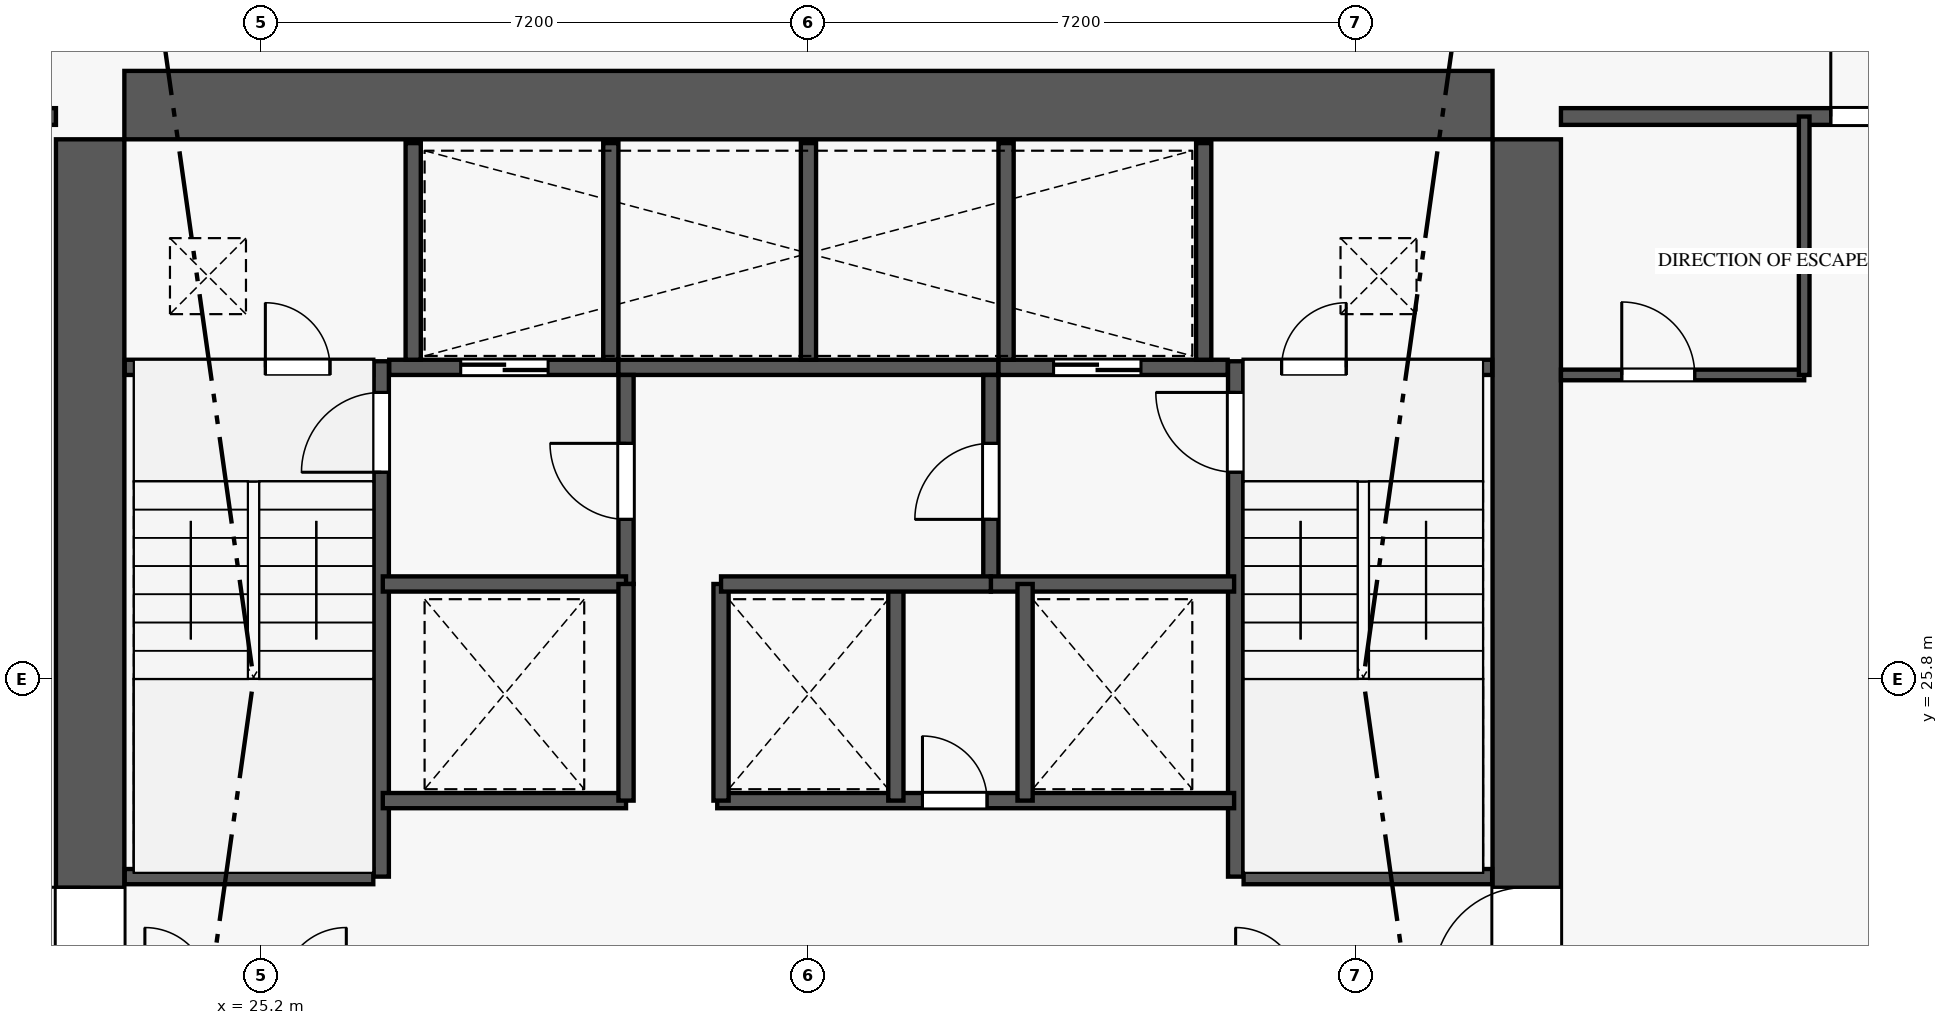
"""IFC4 building model, lengths in metres.
Left out: names, types, materials, properties, quantities, classifications, styles, units other than length and angle.
Written with IfcOpenShell. Run it as: python <this file> out.ifc"""

import sys

from ifc_helpers import new_model, si_unit, direction, frame, frame_2d, origin, origin_2d, place, context, subcontext, project, spatial, rectangle, extrude, element, fill, save


model = new_model("IFC4")
c1 = context("Model", 3, precision=1e-05, world=origin(), true_north=direction((0.0, 1.0)))
c2 = subcontext(c1, "Body", "Model", "MODEL_VIEW")
j1 = project(units=[si_unit("LENGTHUNIT", "METRE"), si_unit("PLANEANGLEUNIT", "RADIAN")], contexts=[c1])
p1 = place(None, origin())
s1 = spatial("IfcSite", under=j1, at=p1, CompositionType="ELEMENT")
p2 = place(p1, origin())
s2 = spatial("IfcBuilding", under=s1, at=p2, CompositionType="ELEMENT")
p3 = place(p2, frame((0.0, 0.0, 74.6)))
s3 = spatial("IfcBuildingStorey", under=s2, at=p3, CompositionType="ELEMENT", Elevation=74.6)
for number, where, z_axis, x_axis in (
    (1, (41.85, 33.35, 0.0), (0.0, 0.0, 1.0), (1.0, 0.0, 0.0)),
    (2, (22.95, 33.35, 0.0), (0.0, 0.0, 1.0), (1.0, 0.0, 0.0)),
):
    element("IfcColumn", number, at=place(p3, frame(where, z_axis=z_axis, x_axis=x_axis)), inside=s3, PredefinedType="COLUMN", context=c2, shape_type="SweptSolid", body=[
        extrude(rectangle(XDim=0.9, YDim=0.9, at=origin_2d()), origin(), (0.0, 0.0, 1.0), 5.4),
    ])
p4 = place(p3, frame((23.4, 33.35, 0.0), z_axis=(0.0, 0.0, 1.0), x_axis=(1.0, 0.0, 0.0)))
e3 = element("IfcWall", 3, at=p4, inside=s3, PredefinedType="SHEAR", context=c2, shape_type="SweptSolid", body=[
    extrude(rectangle(XDim=18.0, YDim=0.9, at=frame_2d((9.0, 0.0))), origin(), (0.0, 0.0, 1.0), 5.18),
])
p5 = place(p3, frame((22.95, 18.9, 0.0), z_axis=(0.0, 0.0, 1.0), x_axis=(0.0, 1.0, 0.0)))
e4 = element("IfcWall", 4, at=p5, inside=s3, PredefinedType="SHEAR", context=c2, shape_type="SweptSolid", body=[
    extrude(rectangle(XDim=14.0, YDim=0.9, at=frame_2d((7.0, 0.0))), origin(), (0.0, 0.0, 1.0), 5.18),
])
p6 = place(p5, frame((2.94, 0.0, 0.0)))
e5 = element("IfcOpeningElement", 5, at=p6, cuts=e4, PredefinedType="OPENING", context=c2, shape_type="SweptSolid", body=[
    extrude(rectangle(XDim=1.22, YDim=2.25, at=frame_2d((0.61, 1.125))), frame((0.0, 0.46, 0.0), z_axis=(0.0, -1.0, 0.0), x_axis=(1.0, 0.0, 0.0)), (0.0, 0.0, 1.0), 0.92),
])
p7 = place(p3, frame((41.85, 18.9, 0.0), z_axis=(0.0, 0.0, 1.0), x_axis=(0.0, 1.0, 0.0)))
e6 = element("IfcWall", 6, at=p7, inside=s3, PredefinedType="SHEAR", context=c2, shape_type="SweptSolid", body=[
    extrude(rectangle(XDim=14.0, YDim=0.9, at=frame_2d((7.0, 0.0))), origin(), (0.0, 0.0, 1.0), 5.18),
])
p8 = place(p7, frame((2.94, 0.0, 0.0)))
e7 = element("IfcOpeningElement", 7, at=p8, cuts=e6, PredefinedType="OPENING", context=c2, shape_type="SweptSolid", body=[
    extrude(rectangle(XDim=1.22, YDim=2.25, at=frame_2d((0.61, 1.125))), frame((0.0, 0.46, 0.0), z_axis=(0.0, -1.0, 0.0), x_axis=(1.0, 0.0, 0.0)), (0.0, 0.0, 1.0), 0.92),
])
p9 = place(p3, frame((26.78, 23.2, 0.0), z_axis=(0.0, 0.0, 1.0), x_axis=(0.0, 1.0, 0.0)))
e8 = element("IfcWall", 8, at=p9, inside=s3, PredefinedType="SHEAR", context=c2, shape_type="SweptSolid", body=[
    extrude(rectangle(XDim=6.78, YDim=0.2, at=frame_2d((3.39, 0.0))), origin(), (0.0, 0.0, 1.0), 5.4),
])
p10 = place(p9, frame((5.32, 0.0, 0.0)))
e9 = element("IfcOpeningElement", 9, at=p10, cuts=e8, PredefinedType="OPENING", context=c2, shape_type="SweptSolid", body=[
    extrude(rectangle(XDim=1.05, YDim=2.15, at=frame_2d((0.525, 1.075))), frame((0.0, 0.11, 0.0), z_axis=(0.0, -1.0, 0.0), x_axis=(1.0, 0.0, 0.0)), (0.0, 0.0, 1.0), 0.22),
])
p11 = place(p3, frame((23.405, 23.2, 0.0), z_axis=(0.0, 0.0, 1.0), x_axis=(1.0, 0.0, 0.0)))
e10 = element("IfcWall", 10, at=p11, inside=s3, PredefinedType="PLUMBINGWALL", context=c2, shape_type="SweptSolid", body=[
    extrude(rectangle(XDim=3.27, YDim=0.2, at=frame_2d((1.635, 0.0))), origin(), (0.0, 0.0, 1.0), 5.18),
])
p12 = place(p3, frame((38.02, 23.2, 0.0), z_axis=(0.0, 0.0, 1.0), x_axis=(0.0, 1.0, 0.0)))
e11 = element("IfcWall", 11, at=p12, inside=s3, PredefinedType="SHEAR", context=c2, shape_type="SweptSolid", body=[
    extrude(rectangle(XDim=6.78, YDim=0.2, at=frame_2d((3.39, 0.0))), origin(), (0.0, 0.0, 1.0), 5.4),
])
p13 = place(p12, frame((5.32, 0.0, 0.0)))
e12 = element("IfcOpeningElement", 12, at=p13, cuts=e11, PredefinedType="OPENING", context=c2, shape_type="SweptSolid", body=[
    extrude(rectangle(XDim=1.05, YDim=2.15, at=frame_2d((0.525, 1.075))), frame((0.0, 0.11, 0.0), z_axis=(0.0, -1.0, 0.0), x_axis=(1.0, 0.0, 0.0)), (0.0, 0.0, 1.0), 0.22),
])
p14 = place(p3, frame((38.125, 23.2, 0.0), z_axis=(0.0, 0.0, 1.0), x_axis=(1.0, 0.0, 0.0)))
e13 = element("IfcWall", 13, at=p14, inside=s3, PredefinedType="PLUMBINGWALL", context=c2, shape_type="SweptSolid", body=[
    extrude(rectangle(XDim=3.27, YDim=0.2, at=frame_2d((1.635, 0.0))), origin(), (0.0, 0.0, 1.0), 5.18),
])
p15 = place(p3, frame((23.405, 29.9, 0.0), z_axis=(0.0, 0.0, 1.0), x_axis=(1.0, 0.0, 0.0)))
e14 = element("IfcWall", 14, at=p15, inside=s3, PredefinedType="PLUMBINGWALL", context=c2, shape_type="SweptSolid", body=[
    extrude(rectangle(XDim=3.27, YDim=0.2, at=frame_2d((1.635, 0.0))), origin(), (0.0, 0.0, 1.0), 5.18),
])
p16 = place(p15, frame((1.85, 0.0, 0.0)))
e15 = element("IfcOpeningElement", 15, at=p16, cuts=e14, PredefinedType="OPENING", context=c2, shape_type="SweptSolid", body=[
    extrude(rectangle(XDim=0.85, YDim=2.05, at=frame_2d((0.425, 1.025))), frame((0.0, 0.11, 0.0), z_axis=(0.0, -1.0, 0.0), x_axis=(1.0, 0.0, 0.0)), (0.0, 0.0, 1.0), 0.22),
])
p17 = place(p3, frame((26.885, 29.9, 0.0), z_axis=(0.0, 0.0, 1.0), x_axis=(1.0, 0.0, 0.0)))
e16 = element("IfcWall", 16, at=p17, inside=s3, PredefinedType="PLUMBINGWALL", context=c2, shape_type="SweptSolid", body=[
    extrude(rectangle(XDim=3.015, YDim=0.2, at=frame_2d((1.507, 0.0))), origin(), (0.0, 0.0, 1.0), 5.18),
])
p18 = place(p17, frame((0.94, 0.0, 0.0)))
e17 = element("IfcOpeningElement", 17, at=p18, cuts=e16, PredefinedType="OPENING", context=c2, shape_type="SweptSolid", body=[
    extrude(rectangle(XDim=1.15, YDim=2.2, at=frame_2d((0.575, 1.1))), frame((0.0, 0.11, 0.0), z_axis=(0.0, -1.0, 0.0), x_axis=(1.0, 0.0, 0.0)), (0.0, 0.0, 1.0), 0.22),
])
p19 = place(p3, frame((29.9, 29.9, 0.0), z_axis=(0.0, 0.0, 1.0), x_axis=(1.0, 0.0, 0.0)))
e18 = element("IfcWall", 18, at=p19, inside=s3, PredefinedType="PLUMBINGWALL", context=c2, shape_type="SweptSolid", body=[
    extrude(rectangle(XDim=5.0, YDim=0.2, at=frame_2d((2.5, 0.0))), origin(), (0.0, 0.0, 1.0), 5.18),
])
p20 = place(p3, frame((34.9, 29.9, 0.0), z_axis=(0.0, 0.0, 1.0), x_axis=(1.0, 0.0, 0.0)))
e19 = element("IfcWall", 19, at=p20, inside=s3, PredefinedType="PLUMBINGWALL", context=c2, shape_type="SweptSolid", body=[
    extrude(rectangle(XDim=3.015, YDim=0.2, at=frame_2d((1.508, 0.0))), origin(), (0.0, 0.0, 1.0), 5.18),
])
p21 = place(p20, frame((0.725, 0.0, 0.0)))
e20 = element("IfcOpeningElement", 20, at=p21, cuts=e19, PredefinedType="OPENING", context=c2, shape_type="SweptSolid", body=[
    extrude(rectangle(XDim=1.15, YDim=2.2, at=frame_2d((0.575, 1.1))), frame((0.0, 0.11, 0.0), z_axis=(0.0, -1.0, 0.0), x_axis=(1.0, 0.0, 0.0)), (0.0, 0.0, 1.0), 0.22),
])
p22 = place(p3, frame((38.125, 29.9, 0.0), z_axis=(0.0, 0.0, 1.0), x_axis=(1.0, 0.0, 0.0)))
e21 = element("IfcWall", 21, at=p22, inside=s3, PredefinedType="PLUMBINGWALL", context=c2, shape_type="SweptSolid", body=[
    extrude(rectangle(XDim=3.27, YDim=0.2, at=frame_2d((1.635, 0.0))), origin(), (0.0, 0.0, 1.0), 5.18),
])
p23 = place(p22, frame((0.5, 0.0, 0.0)))
e22 = element("IfcOpeningElement", 22, at=p23, cuts=e21, PredefinedType="OPENING", context=c2, shape_type="SweptSolid", body=[
    extrude(rectangle(XDim=0.85, YDim=2.05, at=frame_2d((0.425, 1.025))), frame((0.0, 0.11, 0.0), z_axis=(0.0, -1.0, 0.0), x_axis=(1.0, 0.0, 0.0)), (0.0, 0.0, 1.0), 0.22),
])
for number, where, z_axis, x_axis in (
    (23, (27.2, 30.0, 0.0), (0.0, 0.0, 1.0), (0.0, 1.0, 0.0)),
    (24, (29.8, 30.0, 0.0), (0.0, 0.0, 1.0), (0.0, 1.0, 0.0)),
    (25, (32.4, 30.0, 0.0), (0.0, 0.0, 1.0), (0.0, 1.0, 0.0)),
    (26, (35.0, 30.0, 0.0), (0.0, 0.0, 1.0), (0.0, 1.0, 0.0)),
    (27, (37.6, 30.0, 0.0), (0.0, 0.0, 1.0), (0.0, 1.0, 0.0)),
):
    element("IfcWall", number, at=place(p3, frame(where, z_axis=z_axis, x_axis=x_axis)), inside=s3, PredefinedType="PLUMBINGWALL", context=c2, shape_type="SweptSolid", body=[
        extrude(rectangle(XDim=2.85, YDim=0.2, at=frame_2d((1.425, 0.0))), origin(), (0.0, 0.0, 1.0), 5.18),
    ])
p24 = place(p3, frame((30.0, 27.05, 0.0), z_axis=(0.0, 0.0, 1.0), x_axis=(0.0, 1.0, 0.0)))
e28 = element("IfcWall", 28, at=p24, inside=s3, PredefinedType="PLUMBINGWALL", context=c2, shape_type="SweptSolid", body=[
    extrude(rectangle(XDim=2.75, YDim=0.2, at=frame_2d((1.375, 0.0))), origin(), (0.0, 0.0, 1.0), 5.18),
])
p25 = place(p24, frame((0.85, 0.0, 0.0)))
e29 = element("IfcOpeningElement", 29, at=p25, cuts=e28, PredefinedType="OPENING", context=c2, shape_type="SweptSolid", body=[
    extrude(rectangle(XDim=1.0, YDim=2.15, at=frame_2d((0.5, 1.075))), frame((0.0, 0.11, 0.0), z_axis=(0.0, -1.0, 0.0), x_axis=(1.0, 0.0, 0.0)), (0.0, 0.0, 1.0), 0.22),
])
p26 = place(p3, frame((26.8, 27.05, 0.0), z_axis=(0.0, 0.0, 1.0), x_axis=(1.0, 0.0, 0.0)))
e30 = element("IfcWall", 30, at=p26, inside=s3, PredefinedType="PLUMBINGWALL", context=c2, shape_type="SweptSolid", body=[
    extrude(rectangle(XDim=3.2, YDim=0.2, at=frame_2d((1.6, 0.0))), origin(), (0.0, 0.0, 1.0), 5.18),
])
p27 = place(p3, frame((34.8, 27.05, 0.0), z_axis=(0.0, 0.0, 1.0), x_axis=(0.0, 1.0, 0.0)))
e31 = element("IfcWall", 31, at=p27, inside=s3, PredefinedType="PLUMBINGWALL", context=c2, shape_type="SweptSolid", body=[
    extrude(rectangle(XDim=2.75, YDim=0.2, at=frame_2d((1.375, 0.0))), origin(), (0.0, 0.0, 1.0), 5.18),
])
p28 = place(p27, frame((0.85, 0.0, 0.0)))
e32 = element("IfcOpeningElement", 32, at=p28, cuts=e31, PredefinedType="OPENING", context=c2, shape_type="SweptSolid", body=[
    extrude(rectangle(XDim=1.0, YDim=2.15, at=frame_2d((0.5, 1.075))), frame((0.0, 0.11, 0.0), z_axis=(0.0, -1.0, 0.0), x_axis=(1.0, 0.0, 0.0)), (0.0, 0.0, 1.0), 0.22),
])
for number, where, z_axis, x_axis in (
    (33, (34.8, 27.05, 0.0), (0.0, 0.0, 1.0), (1.0, 0.0, 0.0)),
    (34, (26.8, 24.2, 0.0), (0.0, 0.0, 1.0), (1.0, 0.0, 0.0)),
):
    element("IfcWall", number, at=place(p3, frame(where, z_axis=z_axis, x_axis=x_axis)), inside=s3, PredefinedType="PLUMBINGWALL", context=c2, shape_type="SweptSolid", body=[
        extrude(rectangle(XDim=3.2, YDim=0.2, at=frame_2d((1.6, 0.0))), origin(), (0.0, 0.0, 1.0), 5.18),
    ])
p29 = place(p3, frame((30.0, 24.2, 0.0), z_axis=(0.0, 0.0, 1.0), x_axis=(0.0, 1.0, 0.0)))
e35 = element("IfcWall", 35, at=p29, inside=s3, PredefinedType="PLUMBINGWALL", context=c2, shape_type="SweptSolid", body=[
    extrude(rectangle(XDim=2.85, YDim=0.2, at=frame_2d((1.425, 0.0))), origin(), (0.0, 0.0, 1.0), 5.18),
])
p30 = place(p3, frame((31.2, 24.2, 0.0), z_axis=(0.0, 0.0, 1.0), x_axis=(1.0, 0.0, 0.0)))
e36 = element("IfcWall", 36, at=p30, inside=s3, PredefinedType="PLUMBINGWALL", context=c2, shape_type="SweptSolid", body=[
    extrude(rectangle(XDim=6.8, YDim=0.2, at=frame_2d((3.4, 0.0))), origin(), (0.0, 0.0, 1.0), 5.18),
])
p31 = place(p30, frame((2.7, 0.0, 0.0)))
e37 = element("IfcOpeningElement", 37, at=p31, cuts=e36, PredefinedType="OPENING", context=c2, shape_type="SweptSolid", body=[
    extrude(rectangle(XDim=0.85, YDim=2.05, at=frame_2d((0.425, 1.025))), frame((0.0, 0.11, 0.0), z_axis=(0.0, -1.0, 0.0), x_axis=(1.0, 0.0, 0.0)), (0.0, 0.0, 1.0), 0.22),
])
for number, where, z_axis, x_axis in (
    (38, (31.25, 24.2, 0.0), (0.0, 0.0, 1.0), (0.0, 1.0, 0.0)),
    (39, (33.55, 24.2, 0.0), (0.0, 0.0, 1.0), (0.0, 1.0, 0.0)),
    (40, (35.25, 24.2, 0.0), (0.0, 0.0, 1.0), (0.0, 1.0, 0.0)),
):
    element("IfcWall", number, at=place(p3, frame(where, z_axis=z_axis, x_axis=x_axis)), inside=s3, PredefinedType="PLUMBINGWALL", context=c2, shape_type="SweptSolid", body=[
        extrude(rectangle(XDim=2.85, YDim=0.2, at=frame_2d((1.425, 0.0))), origin(), (0.0, 0.0, 1.0), 5.18),
    ])
p32 = place(p3, frame((31.25, 27.05, 0.0), z_axis=(0.0, 0.0, 1.0), x_axis=(1.0, 0.0, 0.0)))
e41 = element("IfcWall", 41, at=p32, inside=s3, PredefinedType="PLUMBINGWALL", context=c2, shape_type="SweptSolid", body=[
    extrude(rectangle(XDim=3.55, YDim=0.2, at=frame_2d((1.775, 0.0))), origin(), (0.0, 0.0, 1.0), 5.18),
])
p33 = place(p3, frame((11.632, 33.2, 0.0), z_axis=(0.0, 0.0, 1.0), x_axis=(1.0, 0.0, 0.0)))
e42 = element("IfcWall", 42, at=p33, inside=s3, PredefinedType="PARTITIONING", context=c2, shape_type="SweptSolid", body=[
    extrude(rectangle(XDim=10.868, YDim=0.22, at=frame_2d((5.434, 0.0))), origin(), (0.0, 0.0, 1.0), 4.487),
])
p34 = place(p33, frame((9.218, 0.0, 0.0)))
e43 = element("IfcOpeningElement", 43, at=p34, cuts=e42, PredefinedType="OPENING", context=c2, shape_type="SweptSolid", body=[
    extrude(rectangle(XDim=1.0, YDim=2.15, at=frame_2d((0.5, 1.075))), frame((0.0, 0.12, 0.0), z_axis=(0.0, -1.0, 0.0), x_axis=(1.0, 0.0, 0.0)), (0.0, 0.0, 1.0), 0.24),
])
p35 = place(p3, frame((42.3, 33.2, 0.0), z_axis=(0.0, 0.0, 1.0), x_axis=(1.0, 0.0, 0.0)))
e44 = element("IfcWall", 44, at=p35, inside=s3, PredefinedType="PARTITIONING", context=c2, shape_type="SweptSolid", body=[
    extrude(rectangle(XDim=10.868, YDim=0.22, at=frame_2d((5.434, 0.0))), origin(), (0.0, 0.0, 1.0), 4.487),
])
p36 = place(p35, frame((3.55, 0.0, 0.0)))
e45 = element("IfcOpeningElement", 45, at=p36, cuts=e44, PredefinedType="OPENING", context=c2, shape_type="SweptSolid", body=[
    extrude(rectangle(XDim=1.0, YDim=2.15, at=frame_2d((0.5, 1.075))), frame((0.0, 0.12, 0.0), z_axis=(0.0, -1.0, 0.0), x_axis=(1.0, 0.0, 0.0)), (0.0, 0.0, 1.0), 0.24),
])
p37 = place(p3, frame((42.3, 29.8, 0.0), z_axis=(0.0, 0.0, 1.0), x_axis=(1.0, 0.0, 0.0)))
e46 = element("IfcWall", 46, at=p37, inside=s3, PredefinedType="PLUMBINGWALL", context=c2, shape_type="SweptSolid", body=[
    extrude(rectangle(XDim=3.2, YDim=0.14, at=frame_2d((1.6, 0.0))), origin(), (0.0, 0.0, 1.0), 5.18),
])
p38 = place(p37, frame((0.8, 0.0, 0.0)))
e47 = element("IfcOpeningElement", 47, at=p38, cuts=e46, PredefinedType="OPENING", context=c2, shape_type="SweptSolid", body=[
    extrude(rectangle(XDim=0.96, YDim=2.15, at=frame_2d((0.48, 1.075))), frame((0.0, 0.08, 0.0), z_axis=(0.0, -1.0, 0.0), x_axis=(1.0, 0.0, 0.0)), (0.0, 0.0, 1.0), 0.16),
])
p39 = place(p3, frame((45.5, 29.8, 0.0), z_axis=(0.0, 0.0, 1.0), x_axis=(0.0, 1.0, 0.0)))
e48 = element("IfcWall", 48, at=p39, inside=s3, PredefinedType="PLUMBINGWALL", context=c2, shape_type="SweptSolid", body=[
    extrude(rectangle(XDim=3.4, YDim=0.14, at=frame_2d((1.7, 0.0))), origin(), (0.0, 0.0, 1.0), 5.18),
])
p40 = place(p6, origin())
e49 = element("IfcDoor", 49, at=p40, inside=s3, OperationType="SINGLE_SWING_RIGHT", PredefinedType="DOOR", context=c2, shape_type="SweptSolid", body=[
    extrude(rectangle(XDim=1.22, YDim=2.25, at=frame_2d((0.61, 1.125))), frame((0.0, 0.025, 0.0), z_axis=(0.0, -1.0, 0.0), x_axis=(1.0, 0.0, 0.0)), (0.0, 0.0, 1.0), 0.05),
])
fill(e5, e49)
p41 = place(p8, origin())
e50 = element("IfcDoor", 50, at=p41, inside=s3, OperationType="SINGLE_SWING_LEFT", PredefinedType="DOOR", context=c2, shape_type="SweptSolid", body=[
    extrude(rectangle(XDim=1.22, YDim=2.25, at=frame_2d((0.61, 1.125))), frame((0.0, 0.025, 0.0), z_axis=(0.0, -1.0, 0.0), x_axis=(1.0, 0.0, 0.0)), (0.0, 0.0, 1.0), 0.05),
])
fill(e7, e50)
p42 = place(p10, origin())
e51 = element("IfcDoor", 51, at=p42, inside=s3, OperationType="SINGLE_SWING_LEFT", PredefinedType="DOOR", context=c2, shape_type="SweptSolid", body=[
    extrude(rectangle(XDim=1.05, YDim=2.15, at=frame_2d((0.525, 1.075))), frame((0.0, 0.025, 0.0), z_axis=(0.0, -1.0, 0.0), x_axis=(1.0, 0.0, 0.0)), (0.0, 0.0, 1.0), 0.05),
])
fill(e9, e51)
p43 = place(p13, origin())
e52 = element("IfcDoor", 52, at=p43, inside=s3, OperationType="SINGLE_SWING_RIGHT", PredefinedType="DOOR", context=c2, shape_type="SweptSolid", body=[
    extrude(rectangle(XDim=1.05, YDim=2.15, at=frame_2d((0.525, 1.075))), frame((0.0, 0.025, 0.0), z_axis=(0.0, -1.0, 0.0), x_axis=(1.0, 0.0, 0.0)), (0.0, 0.0, 1.0), 0.05),
])
fill(e12, e52)
p44 = place(p16, origin())
e53 = element("IfcDoor", 53, at=p44, inside=s3, OperationType="SINGLE_SWING_LEFT", PredefinedType="DOOR", context=c2, shape_type="SweptSolid", body=[
    extrude(rectangle(XDim=0.85, YDim=2.05, at=frame_2d((0.425, 1.025))), frame((0.0, 0.025, 0.0), z_axis=(0.0, -1.0, 0.0), x_axis=(1.0, 0.0, 0.0)), (0.0, 0.0, 1.0), 0.05),
])
fill(e15, e53)
p45 = place(p23, origin())
e54 = element("IfcDoor", 54, at=p45, inside=s3, OperationType="SINGLE_SWING_RIGHT", PredefinedType="DOOR", context=c2, shape_type="SweptSolid", body=[
    extrude(rectangle(XDim=0.85, YDim=2.05, at=frame_2d((0.425, 1.025))), frame((0.0, 0.025, 0.0), z_axis=(0.0, -1.0, 0.0), x_axis=(1.0, 0.0, 0.0)), (0.0, 0.0, 1.0), 0.05),
])
fill(e22, e54)
p46 = place(p18, origin())
e55 = element("IfcDoor", 55, at=p46, inside=s3, OperationType="DOUBLE_DOOR_SLIDING", PredefinedType="DOOR", context=c2, shape_type="SweptSolid", body=[
    extrude(rectangle(XDim=1.15, YDim=2.2, at=frame_2d((0.575, 1.1))), frame((0.0, 0.025, 0.0), z_axis=(0.0, -1.0, 0.0), x_axis=(1.0, 0.0, 0.0)), (0.0, 0.0, 1.0), 0.05),
])
fill(e17, e55)
p47 = place(p21, origin())
e56 = element("IfcDoor", 56, at=p47, inside=s3, OperationType="DOUBLE_DOOR_SLIDING", PredefinedType="DOOR", context=c2, shape_type="SweptSolid", body=[
    extrude(rectangle(XDim=1.15, YDim=2.2, at=frame_2d((0.575, 1.1))), frame((0.0, 0.025, 0.0), z_axis=(0.0, -1.0, 0.0), x_axis=(1.0, 0.0, 0.0)), (0.0, 0.0, 1.0), 0.05),
])
fill(e20, e56)
p48 = place(p25, origin())
e57 = element("IfcDoor", 57, at=p48, inside=s3, OperationType="SINGLE_SWING_RIGHT", PredefinedType="DOOR", context=c2, shape_type="SweptSolid", body=[
    extrude(rectangle(XDim=1.0, YDim=2.15, at=frame_2d((0.5, 1.075))), frame((0.0, 0.025, 0.0), z_axis=(0.0, -1.0, 0.0), x_axis=(1.0, 0.0, 0.0)), (0.0, 0.0, 1.0), 0.05),
])
fill(e29, e57)
p49 = place(p28, origin())
e58 = element("IfcDoor", 58, at=p49, inside=s3, OperationType="SINGLE_SWING_LEFT", PredefinedType="DOOR", context=c2, shape_type="SweptSolid", body=[
    extrude(rectangle(XDim=1.0, YDim=2.15, at=frame_2d((0.5, 1.075))), frame((0.0, 0.025, 0.0), z_axis=(0.0, -1.0, 0.0), x_axis=(1.0, 0.0, 0.0)), (0.0, 0.0, 1.0), 0.05),
])
fill(e32, e58)
p50 = place(p31, origin())
e59 = element("IfcDoor", 59, at=p50, inside=s3, OperationType="SINGLE_SWING_LEFT", PredefinedType="DOOR", context=c2, shape_type="SweptSolid", body=[
    extrude(rectangle(XDim=0.85, YDim=2.05, at=frame_2d((0.425, 1.025))), frame((0.0, 0.025, 0.0), z_axis=(0.0, -1.0, 0.0), x_axis=(1.0, 0.0, 0.0)), (0.0, 0.0, 1.0), 0.05),
])
fill(e37, e59)
p51 = place(p38, origin())
e60 = element("IfcDoor", 60, at=p51, inside=s3, OperationType="SINGLE_SWING_LEFT", PredefinedType="DOOR", context=c2, shape_type="SweptSolid", body=[
    extrude(rectangle(XDim=0.96, YDim=2.15, at=frame_2d((0.48, 1.075))), frame((0.0, 0.025, 0.0), z_axis=(0.0, -1.0, 0.0), x_axis=(1.0, 0.0, 0.0)), (0.0, 0.0, 1.0), 0.05),
])
fill(e47, e60)
p52 = place(p36, origin())
e61 = element("IfcDoor", 61, at=p52, inside=s3, OperationType="SINGLE_SWING_LEFT", PredefinedType="DOOR", context=c2, shape_type="SweptSolid", body=[
    extrude(rectangle(XDim=1.0, YDim=2.15, at=frame_2d((0.5, 1.075))), frame((0.0, 0.025, 0.0), z_axis=(0.0, -1.0, 0.0), x_axis=(1.0, 0.0, 0.0)), (0.0, 0.0, 1.0), 0.05),
])
fill(e45, e61)
save(model, sys.argv[1])
